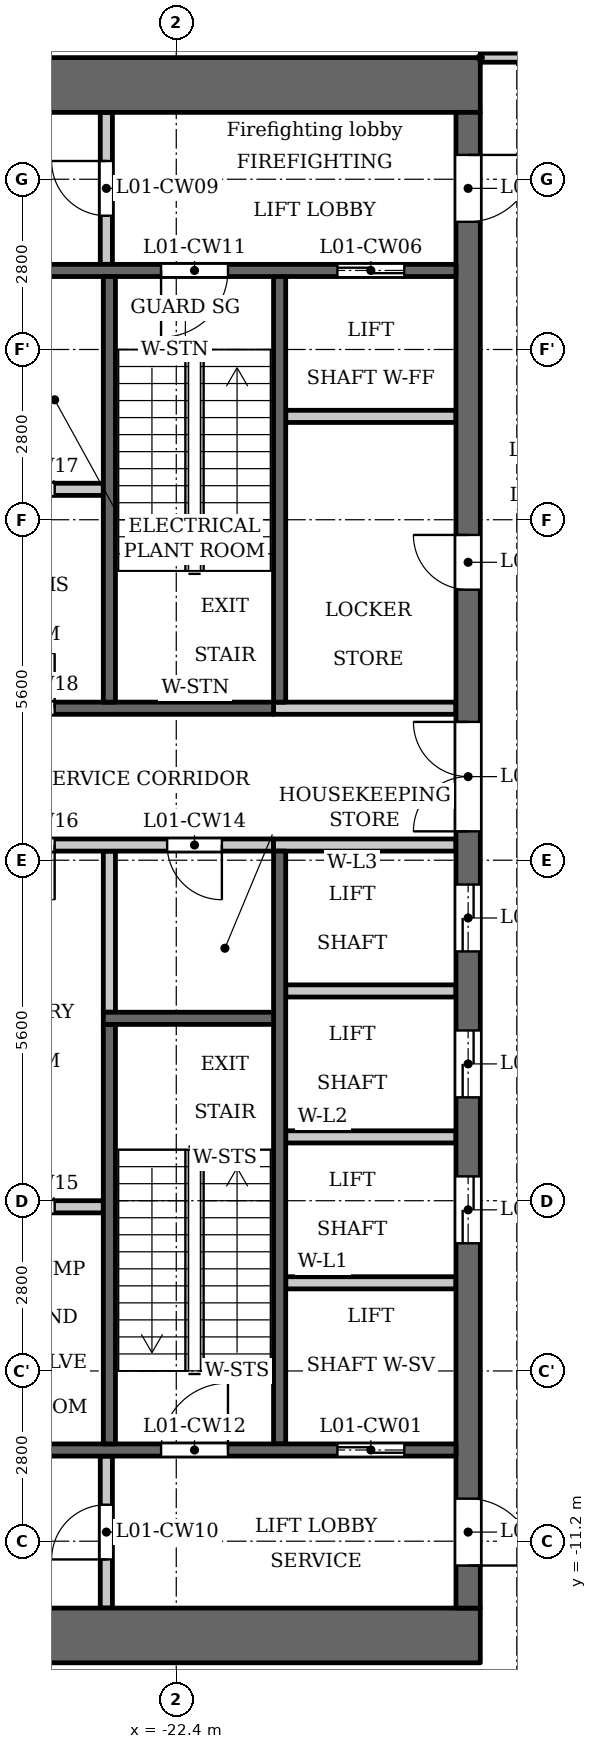
"""IFC4 building model, lengths in metres.
Left out: names, types, materials, properties, quantities, classifications, styles, units other than length and angle.
Written with IfcOpenShell. Run it as: python <this file> out.ifc"""

import sys

from ifc_helpers import new_model, si_unit, direction, frame, frame_2d, origin, place, context, subcontext, project, spatial, rectangle, extrude, element, fill, save


model = new_model("IFC4")
c1 = context("Model", 3, precision=1e-05, world=origin(), true_north=direction((0.0, 1.0)))
c2 = subcontext(c1, "Body", "Model", "MODEL_VIEW")
j1 = project(units=[si_unit("LENGTHUNIT", "METRE"), si_unit("PLANEANGLEUNIT", "RADIAN")], contexts=[c1])
p1 = place(None, origin())
s1 = spatial("IfcSite", under=j1, at=p1, CompositionType="ELEMENT")
p2 = place(p1, origin())
s2 = spatial("IfcBuilding", under=s1, at=p2, CompositionType="ELEMENT")
p3 = place(p2, frame((0.0, 0.0, 6.5)))
s3 = spatial("IfcBuildingStorey", under=s2, at=p3, CompositionType="ELEMENT", Elevation=6.5)
p4 = place(p3, frame((-23.5, -2.5, 0.0), z_axis=(0.0, 0.0, 1.0), x_axis=(0.0, 1.0, 0.0)))
e1 = element("IfcWall", 1, at=p4, inside=s3, PredefinedType="PARTITIONING", context=c2, shape_type="SweptSolid", body=[
    extrude(rectangle(XDim=2.65, YDim=0.2, at=frame_2d((1.325, 0.0))), origin(), (0.0, 0.0, 1.0), 4.45),
])
p5 = place(p3, frame((-20.7, 2.6, 0.0), z_axis=(0.0, 0.0, 1.0), x_axis=(0.0, 1.0, 0.0)))
e2 = element("IfcWall", 2, at=p5, inside=s3, PredefinedType="SHEAR", context=c2, shape_type="SweptSolid", body=[
    extrude(rectangle(XDim=7.0, YDim=0.2, at=frame_2d((3.5, 0.0))), origin(), (0.0, 0.0, 1.0), 4.45),
])
p6 = place(p3, frame((-20.7, -9.6, 0.0), z_axis=(0.0, 0.0, 1.0), x_axis=(0.0, 1.0, 0.0)))
e3 = element("IfcWall", 3, at=p6, inside=s3, PredefinedType="SHEAR", context=c2, shape_type="SweptSolid", body=[
    extrude(rectangle(XDim=9.75, YDim=0.2, at=frame_2d((4.875, 0.0))), origin(), (0.0, 0.0, 1.0), 4.45),
])
p7 = place(p3, frame((-20.8, 2.5, 0.0), z_axis=(0.0, 0.0, 1.0), x_axis=(-1.0, 0.0, 0.0)))
e4 = element("IfcWall", 4, at=p7, inside=s3, PredefinedType="SHEAR", context=c2, shape_type="SweptSolid", body=[
    extrude(rectangle(XDim=5.3, YDim=0.2, at=frame_2d((2.65, 0.0))), origin(), (0.0, 0.0, 1.0), 4.45),
])
p8 = place(p7, frame((3.6, 0.0, 0.0)))
e5 = element("IfcOpeningElement", 5, at=p8, cuts=e4, PredefinedType="OPENING", context=c2, shape_type="SweptSolid", body=[
    extrude(rectangle(XDim=0.9, YDim=2.1, at=frame_2d((0.45, 1.05))), frame((0.0, 0.11, 0.0), z_axis=(0.0, -1.0, 0.0), x_axis=(1.0, 0.0, 0.0)), (0.0, 0.0, 1.0), 0.22),
])
p9 = place(p3, frame((-20.8, 0.25, 0.0), z_axis=(0.0, 0.0, 1.0), x_axis=(-1.0, 0.0, 0.0)))
e6 = element("IfcWall", 6, at=p9, inside=s3, PredefinedType="PARTITIONING", context=c2, shape_type="SweptSolid", body=[
    extrude(rectangle(XDim=5.3, YDim=0.2, at=frame_2d((2.65, 0.0))), origin(), (0.0, 0.0, 1.0), 4.45),
])
p10 = place(p9, frame((0.85, 0.0, 0.0)))
e7 = element("IfcOpeningElement", 7, at=p10, cuts=e6, PredefinedType="OPENING", context=c2, shape_type="SweptSolid", body=[
    extrude(rectangle(XDim=0.9, YDim=2.1, at=frame_2d((0.45, 1.05))), frame((0.0, 0.11, 0.0), z_axis=(0.0, -1.0, 0.0), x_axis=(1.0, 0.0, 0.0)), (0.0, 0.0, 1.0), 0.22),
])
p11 = place(p9, frame((3.6, 0.0, 0.0)))
e8 = element("IfcOpeningElement", 8, at=p11, cuts=e6, PredefinedType="OPENING", context=c2, shape_type="SweptSolid", body=[
    extrude(rectangle(XDim=0.9, YDim=2.1, at=frame_2d((0.45, 1.05))), frame((0.0, 0.11, 0.0), z_axis=(0.0, -1.0, 0.0), x_axis=(1.0, 0.0, 0.0)), (0.0, 0.0, 1.0), 0.22),
])
for number, where, z_axis, x_axis in (
    (9, (-17.4, 12.75, 0.0), (0.0, 0.0, 1.0), (-1.0, 0.0, 0.0)),
    (10, (-17.4, -12.75, 0.0), (0.0, 0.0, 1.0), (-1.0, 0.0, 0.0)),
):
    element("IfcWall", number, at=place(p3, frame(where, z_axis=z_axis, x_axis=x_axis)), inside=s3, PredefinedType="SHEAR", context=c2, shape_type="SweptSolid", body=[
        extrude(rectangle(XDim=10.4, YDim=0.9, at=frame_2d((5.2, 0.0))), origin(), (0.0, 0.0, 1.0), 4.45),
    ])
p12 = place(p3, frame((-17.6, -12.3, 0.0), z_axis=(0.0, 0.0, 1.0), x_axis=(0.0, 1.0, 0.0)))
e11 = element("IfcWall", 11, at=p12, inside=s3, PredefinedType="SHEAR", context=c2, shape_type="SweptSolid", body=[
    extrude(rectangle(XDim=24.6, YDim=0.4, at=frame_2d((12.3, 0.0))), origin(), (0.0, 0.0, 1.0), 4.45),
])
p13 = place(p12, frame((6.0, 0.0, 0.0)))
e12 = element("IfcOpeningElement", 12, at=p13, cuts=e11, PredefinedType="OPENING", context=c2, shape_type="SweptSolid", body=[
    extrude(rectangle(XDim=1.1, YDim=2.1, at=frame_2d((0.55, 1.05))), frame((0.0, 0.21, 0.0), z_axis=(0.0, -1.0, 0.0), x_axis=(1.0, 0.0, 0.0)), (0.0, 0.0, 1.0), 0.42),
])
p14 = place(p12, frame((8.4, 0.0, 0.0)))
e13 = element("IfcOpeningElement", 13, at=p14, cuts=e11, PredefinedType="OPENING", context=c2, shape_type="SweptSolid", body=[
    extrude(rectangle(XDim=1.1, YDim=2.1, at=frame_2d((0.55, 1.05))), frame((0.0, 0.21, 0.0), z_axis=(0.0, -1.0, 0.0), x_axis=(1.0, 0.0, 0.0)), (0.0, 0.0, 1.0), 0.42),
])
p15 = place(p12, frame((10.8, 0.0, 0.0)))
e14 = element("IfcOpeningElement", 14, at=p15, cuts=e11, PredefinedType="OPENING", context=c2, shape_type="SweptSolid", body=[
    extrude(rectangle(XDim=1.1, YDim=2.1, at=frame_2d((0.55, 1.05))), frame((0.0, 0.21, 0.0), z_axis=(0.0, -1.0, 0.0), x_axis=(1.0, 0.0, 0.0)), (0.0, 0.0, 1.0), 0.42),
])
p16 = place(p12, frame((16.75, 0.0, 0.0)))
e15 = element("IfcOpeningElement", 15, at=p16, cuts=e11, PredefinedType="OPENING", context=c2, shape_type="SweptSolid", body=[
    extrude(rectangle(XDim=0.9, YDim=2.1, at=frame_2d((0.45, 1.05))), frame((0.0, 0.21, 0.0), z_axis=(0.0, -1.0, 0.0), x_axis=(1.0, 0.0, 0.0)), (0.0, 0.0, 1.0), 0.42),
])
p17 = place(p12, frame((22.8, 0.0, 0.0)))
e16 = element("IfcOpeningElement", 16, at=p17, cuts=e11, PredefinedType="OPENING", context=c2, shape_type="SweptSolid", body=[
    extrude(rectangle(XDim=1.1, YDim=2.1, at=frame_2d((0.55, 1.05))), frame((0.0, 0.21, 0.0), z_axis=(0.0, -1.0, 0.0), x_axis=(1.0, 0.0, 0.0)), (0.0, 0.0, 1.0), 0.42),
])
p18 = place(p12, frame((0.7, 0.0, 0.0)))
e17 = element("IfcOpeningElement", 17, at=p18, cuts=e11, PredefinedType="OPENING", context=c2, shape_type="SweptSolid", body=[
    extrude(rectangle(XDim=1.1, YDim=2.1, at=frame_2d((0.55, 1.05))), frame((0.0, 0.21, 0.0), z_axis=(0.0, -1.0, 0.0), x_axis=(1.0, 0.0, 0.0)), (0.0, 0.0, 1.0), 0.42),
])
p19 = place(p12, frame((12.775, 0.0, 0.0)))
e18 = element("IfcOpeningElement", 18, at=p19, cuts=e11, PredefinedType="OPENING", context=c2, shape_type="SweptSolid", body=[
    extrude(rectangle(XDim=1.8, YDim=2.1, at=frame_2d((0.9, 1.05))), frame((0.0, 0.21, 0.0), z_axis=(0.0, -1.0, 0.0), x_axis=(1.0, 0.0, 0.0)), (0.0, 0.0, 1.0), 0.42),
])
p20 = place(p3, frame((-23.55, 9.8, 0.0), z_axis=(0.0, 0.0, 1.0), x_axis=(0.0, 1.0, 0.0)))
e19 = element("IfcWall", 19, at=p20, inside=s3, PredefinedType="PARTITIONING", context=c2, shape_type="SweptSolid", body=[
    extrude(rectangle(XDim=2.5, YDim=0.2, at=frame_2d((1.25, 0.0))), origin(), (0.0, 0.0, 1.0), 4.45),
])
p21 = place(p20, frame((0.8, 0.0, 0.0)))
e20 = element("IfcOpeningElement", 20, at=p21, cuts=e19, PredefinedType="OPENING", context=c2, shape_type="SweptSolid", body=[
    extrude(rectangle(XDim=0.9, YDim=2.1, at=frame_2d((0.45, 1.05))), frame((0.0, 0.11, 0.0), z_axis=(0.0, -1.0, 0.0), x_axis=(1.0, 0.0, 0.0)), (0.0, 0.0, 1.0), 0.22),
])
p22 = place(p3, frame((-23.55, -12.3, 0.0), z_axis=(0.0, 0.0, 1.0), x_axis=(0.0, 1.0, 0.0)))
e21 = element("IfcWall", 21, at=p22, inside=s3, PredefinedType="PARTITIONING", context=c2, shape_type="SweptSolid", body=[
    extrude(rectangle(XDim=2.5, YDim=0.2, at=frame_2d((1.25, 0.0))), origin(), (0.0, 0.0, 1.0), 4.45),
])
p23 = place(p22, frame((0.8, 0.0, 0.0)))
e22 = element("IfcOpeningElement", 22, at=p23, cuts=e21, PredefinedType="OPENING", context=c2, shape_type="SweptSolid", body=[
    extrude(rectangle(XDim=0.9, YDim=2.1, at=frame_2d((0.45, 1.05))), frame((0.0, 0.11, 0.0), z_axis=(0.0, -1.0, 0.0), x_axis=(1.0, 0.0, 0.0)), (0.0, 0.0, 1.0), 0.22),
])
p24 = place(p3, frame((-23.6, -5.7, 0.0), z_axis=(0.0, 0.0, 1.0), x_axis=(-1.0, 0.0, 0.0)))
e23 = element("IfcWall", 23, at=p24, inside=s3, PredefinedType="PARTITIONING", context=c2, shape_type="SweptSolid", body=[
    extrude(rectangle(XDim=2.5, YDim=0.2, at=frame_2d((1.25, 0.0))), origin(), (0.0, 0.0, 1.0), 4.45),
])
p25 = place(p24, frame((0.8, 0.0, 0.0)))
e24 = element("IfcOpeningElement", 24, at=p25, cuts=e23, PredefinedType="OPENING", context=c2, shape_type="SweptSolid", body=[
    extrude(rectangle(XDim=0.9, YDim=2.1, at=frame_2d((0.45, 1.05))), frame((0.0, 0.11, 0.0), z_axis=(0.0, -1.0, 0.0), x_axis=(1.0, 0.0, 0.0)), (0.0, 0.0, 1.0), 0.22),
])
p26 = place(p3, frame((-23.6, 6.1, 0.0), z_axis=(0.0, 0.0, 1.0), x_axis=(-1.0, 0.0, 0.0)))
e25 = element("IfcWall", 25, at=p26, inside=s3, PredefinedType="PARTITIONING", context=c2, shape_type="SweptSolid", body=[
    extrude(rectangle(XDim=2.5, YDim=0.2, at=frame_2d((1.25, 0.0))), origin(), (0.0, 0.0, 1.0), 4.45),
])
p27 = place(p26, frame((0.8, 0.0, 0.0)))
e26 = element("IfcOpeningElement", 26, at=p27, cuts=e25, PredefinedType="OPENING", context=c2, shape_type="SweptSolid", body=[
    extrude(rectangle(XDim=0.9, YDim=2.1, at=frame_2d((0.45, 1.05))), frame((0.0, 0.11, 0.0), z_axis=(0.0, -1.0, 0.0), x_axis=(1.0, 0.0, 0.0)), (0.0, 0.0, 1.0), 0.22),
])
p28 = place(p3, frame((-17.8, -9.7, 0.0), z_axis=(0.0, 0.0, 1.0), x_axis=(-1.0, 0.0, 0.0)))
e27 = element("IfcWall", 27, at=p28, inside=s3, PredefinedType="SHEAR", context=c2, shape_type="SweptSolid", body=[
    extrude(rectangle(XDim=8.3, YDim=0.2, at=frame_2d((4.15, 0.0))), origin(), (0.0, 0.0, 1.0), 4.45),
])
p29 = place(p28, frame((0.85, 0.0, 0.0)))
e28 = element("IfcOpeningElement", 28, at=p29, cuts=e27, PredefinedType="OPENING", context=c2, shape_type="SweptSolid", body=[
    extrude(rectangle(XDim=1.1, YDim=2.1, at=frame_2d((0.55, 1.05))), frame((0.0, 0.11, 0.0), z_axis=(0.0, -1.0, 0.0), x_axis=(1.0, 0.0, 0.0)), (0.0, 0.0, 1.0), 0.22),
])
p30 = place(p28, frame((3.75, 0.0, 0.0)))
e29 = element("IfcOpeningElement", 29, at=p30, cuts=e27, PredefinedType="OPENING", context=c2, shape_type="SweptSolid", body=[
    extrude(rectangle(XDim=1.1, YDim=2.1, at=frame_2d((0.55, 1.05))), frame((0.0, 0.11, 0.0), z_axis=(0.0, -1.0, 0.0), x_axis=(1.0, 0.0, 0.0)), (0.0, 0.0, 1.0), 0.22),
])
for number, where, z_axis, x_axis in (
    (30, (-17.8, -6.95, 0.0), (0.0, 0.0, 1.0), (-1.0, 0.0, 0.0)),
    (31, (-17.8, -4.55, 0.0), (0.0, 0.0, 1.0), (-1.0, 0.0, 0.0)),
    (32, (-17.8, -2.15, 0.0), (0.0, 0.0, 1.0), (-1.0, 0.0, 0.0)),
):
    element("IfcWall", number, at=place(p3, frame(where, z_axis=z_axis, x_axis=x_axis)), inside=s3, PredefinedType="PARTITIONING", context=c2, shape_type="SweptSolid", body=[
        extrude(rectangle(XDim=2.8, YDim=0.2, at=frame_2d((1.4, 0.0))), origin(), (0.0, 0.0, 1.0), 4.45),
    ])
for number, where, z_axis, x_axis in (
    (33, (-17.8, 0.25, 0.0), (0.0, 0.0, 1.0), (-1.0, 0.0, 0.0)),
    (34, (-17.8, 2.5, 0.0), (0.0, 0.0, 1.0), (-1.0, 0.0, 0.0)),
):
    element("IfcWall", number, at=place(p3, frame(where, z_axis=z_axis, x_axis=x_axis)), inside=s3, PredefinedType="PARTITIONING", context=c2, shape_type="SweptSolid", body=[
        extrude(rectangle(XDim=3.0, YDim=0.2, at=frame_2d((1.5, 0.0))), origin(), (0.0, 0.0, 1.0), 4.45),
    ])
p31 = place(p3, frame((-17.8, 7.3, 0.0), z_axis=(0.0, 0.0, 1.0), x_axis=(-1.0, 0.0, 0.0)))
e35 = element("IfcWall", 35, at=p31, inside=s3, PredefinedType="PARTITIONING", context=c2, shape_type="SweptSolid", body=[
    extrude(rectangle(XDim=2.8, YDim=0.2, at=frame_2d((1.4, 0.0))), origin(), (0.0, 0.0, 1.0), 4.45),
])
p32 = place(p3, frame((-17.8, 9.7, 0.0), z_axis=(0.0, 0.0, 1.0), x_axis=(-1.0, 0.0, 0.0)))
e36 = element("IfcWall", 36, at=p32, inside=s3, PredefinedType="SHEAR", context=c2, shape_type="SweptSolid", body=[
    extrude(rectangle(XDim=8.3, YDim=0.2, at=frame_2d((4.15, 0.0))), origin(), (0.0, 0.0, 1.0), 4.45),
])
p33 = place(p32, frame((0.85, 0.0, 0.0)))
e37 = element("IfcOpeningElement", 37, at=p33, cuts=e36, PredefinedType="OPENING", context=c2, shape_type="SweptSolid", body=[
    extrude(rectangle(XDim=1.1, YDim=2.1, at=frame_2d((0.55, 1.05))), frame((0.0, 0.11, 0.0), z_axis=(0.0, -1.0, 0.0), x_axis=(1.0, 0.0, 0.0)), (0.0, 0.0, 1.0), 0.22),
])
p34 = place(p32, frame((3.75, 0.0, 0.0)))
e38 = element("IfcOpeningElement", 38, at=p34, cuts=e36, PredefinedType="OPENING", context=c2, shape_type="SweptSolid", body=[
    extrude(rectangle(XDim=1.1, YDim=2.1, at=frame_2d((0.55, 1.05))), frame((0.0, 0.11, 0.0), z_axis=(0.0, -1.0, 0.0), x_axis=(1.0, 0.0, 0.0)), (0.0, 0.0, 1.0), 0.22),
])
p35 = place(p3, frame((-23.5, 2.6, 0.0), z_axis=(0.0, 0.0, 1.0), x_axis=(0.0, 1.0, 0.0)))
e39 = element("IfcWall", 39, at=p35, inside=s3, PredefinedType="SHEAR", context=c2, shape_type="SweptSolid", body=[
    extrude(rectangle(XDim=7.0, YDim=0.2, at=frame_2d((3.5, 0.0))), origin(), (0.0, 0.0, 1.0), 4.45),
])
p36 = place(p3, frame((-23.5, -9.6, 0.0), z_axis=(0.0, 0.0, 1.0), x_axis=(0.0, 1.0, 0.0)))
e40 = element("IfcWall", 40, at=p36, inside=s3, PredefinedType="SHEAR", context=c2, shape_type="SweptSolid", body=[
    extrude(rectangle(XDim=6.9, YDim=0.2, at=frame_2d((3.45, 0.0))), origin(), (0.0, 0.0, 1.0), 4.45),
])
p37 = place(p3, frame((-20.8, -2.6, 0.0), z_axis=(0.0, 0.0, 1.0), x_axis=(-1.0, 0.0, 0.0)))
e41 = element("IfcWall", 41, at=p37, inside=s3, PredefinedType="SHEAR", context=c2, shape_type="SweptSolid", body=[
    extrude(rectangle(XDim=2.8, YDim=0.2, at=frame_2d((1.4, 0.0))), origin(), (0.0, 0.0, 1.0), 4.45),
])
p38 = place(p3, frame((-17.4, 13.2, 0.0), z_axis=(0.0, 0.0, 1.0), x_axis=(1.0, 0.0, 0.0)))
e42 = element("IfcWall", 42, at=p38, inside=s3, PredefinedType="PARTITIONING", context=c2, shape_type="SweptSolid", body=[
    extrude(rectangle(XDim=34.8, YDim=0.15, at=frame_2d((17.4, 0.0))), origin(), (0.0, 0.0, 1.0), 4.45),
])
p39 = place(p38, frame((3.05, 0.0, 0.0)))
e43 = element("IfcOpeningElement", 43, at=p39, cuts=e42, PredefinedType="OPENING", context=c2, shape_type="SweptSolid", body=[
    extrude(rectangle(XDim=1.8, YDim=2.1, at=frame_2d((0.9, 1.05))), frame((0.0, 0.085, 0.0), z_axis=(0.0, -1.0, 0.0), x_axis=(1.0, 0.0, 0.0)), (0.0, 0.0, 1.0), 0.17),
])
p40 = place(p38, frame((0.75, 0.0, 0.0)))
e44 = element("IfcOpeningElement", 44, at=p40, cuts=e42, PredefinedType="OPENING", context=c2, shape_type="SweptSolid", body=[
    extrude(rectangle(XDim=1.0, YDim=2.1, at=frame_2d((0.5, 1.05))), frame((0.0, 0.085, 0.0), z_axis=(0.0, -1.0, 0.0), x_axis=(1.0, 0.0, 0.0)), (0.0, 0.0, 1.0), 0.17),
])
p41 = place(p38, frame((33.15, 0.0, 0.0)))
e45 = element("IfcOpeningElement", 45, at=p41, cuts=e42, PredefinedType="OPENING", context=c2, shape_type="SweptSolid", body=[
    extrude(rectangle(XDim=1.0, YDim=2.1, at=frame_2d((0.5, 1.05))), frame((0.0, 0.085, 0.0), z_axis=(0.0, -1.0, 0.0), x_axis=(1.0, 0.0, 0.0)), (0.0, 0.0, 1.0), 0.17),
])
p42 = place(p29, origin())
e46 = element("IfcDoor", 46, at=p42, inside=s3, OperationType="DOUBLE_DOOR_SLIDING", PredefinedType="DOOR", context=c2, shape_type="SweptSolid", body=[
    extrude(rectangle(XDim=1.1, YDim=2.1, at=frame_2d((0.55, 1.05))), frame((0.0, 0.025, 0.0), z_axis=(0.0, -1.0, 0.0), x_axis=(1.0, 0.0, 0.0)), (0.0, 0.0, 1.0), 0.05),
])
fill(e28, e46)
p43 = place(p13, origin())
e47 = element("IfcDoor", 47, at=p43, inside=s3, OperationType="DOUBLE_DOOR_SLIDING", PredefinedType="DOOR", context=c2, shape_type="SweptSolid", body=[
    extrude(rectangle(XDim=1.1, YDim=2.1, at=frame_2d((0.55, 1.05))), frame((0.0, 0.025, 0.0), z_axis=(0.0, -1.0, 0.0), x_axis=(1.0, 0.0, 0.0)), (0.0, 0.0, 1.0), 0.05),
])
fill(e12, e47)
p44 = place(p14, origin())
e48 = element("IfcDoor", 48, at=p44, inside=s3, OperationType="DOUBLE_DOOR_SLIDING", PredefinedType="DOOR", context=c2, shape_type="SweptSolid", body=[
    extrude(rectangle(XDim=1.1, YDim=2.1, at=frame_2d((0.55, 1.05))), frame((0.0, 0.025, 0.0), z_axis=(0.0, -1.0, 0.0), x_axis=(1.0, 0.0, 0.0)), (0.0, 0.0, 1.0), 0.05),
])
fill(e13, e48)
p45 = place(p15, origin())
e49 = element("IfcDoor", 49, at=p45, inside=s3, OperationType="DOUBLE_DOOR_SLIDING", PredefinedType="DOOR", context=c2, shape_type="SweptSolid", body=[
    extrude(rectangle(XDim=1.1, YDim=2.1, at=frame_2d((0.55, 1.05))), frame((0.0, 0.025, 0.0), z_axis=(0.0, -1.0, 0.0), x_axis=(1.0, 0.0, 0.0)), (0.0, 0.0, 1.0), 0.05),
])
fill(e14, e49)
p46 = place(p16, origin())
e50 = element("IfcDoor", 50, at=p46, inside=s3, OperationType="SINGLE_SWING_LEFT", PredefinedType="DOOR", context=c2, shape_type="SweptSolid", body=[
    extrude(rectangle(XDim=0.9, YDim=2.1, at=frame_2d((0.45, 1.05))), frame((0.0, 0.025, 0.0), z_axis=(0.0, -1.0, 0.0), x_axis=(1.0, 0.0, 0.0)), (0.0, 0.0, 1.0), 0.05),
])
fill(e15, e50)
p47 = place(p33, origin())
e51 = element("IfcDoor", 51, at=p47, inside=s3, OperationType="DOUBLE_DOOR_SLIDING", PredefinedType="DOOR", context=c2, shape_type="SweptSolid", body=[
    extrude(rectangle(XDim=1.1, YDim=2.1, at=frame_2d((0.55, 1.05))), frame((0.0, 0.025, 0.0), z_axis=(0.0, -1.0, 0.0), x_axis=(1.0, 0.0, 0.0)), (0.0, 0.0, 1.0), 0.05),
])
fill(e37, e51)
p48 = place(p17, origin())
e52 = element("IfcDoor", 52, at=p48, inside=s3, OperationType="SINGLE_SWING_RIGHT", PredefinedType="DOOR", context=c2, shape_type="SweptSolid", body=[
    extrude(rectangle(XDim=1.1, YDim=2.1, at=frame_2d((0.55, 1.05))), frame((0.0, 0.025, 0.0), z_axis=(0.0, -1.0, 0.0), x_axis=(1.0, 0.0, 0.0)), (0.0, 0.0, 1.0), 0.05),
])
fill(e16, e52)
p49 = place(p18, origin())
e53 = element("IfcDoor", 53, at=p49, inside=s3, OperationType="SINGLE_SWING_LEFT", PredefinedType="DOOR", context=c2, shape_type="SweptSolid", body=[
    extrude(rectangle(XDim=1.1, YDim=2.1, at=frame_2d((0.55, 1.05))), frame((0.0, 0.025, 0.0), z_axis=(0.0, -1.0, 0.0), x_axis=(1.0, 0.0, 0.0)), (0.0, 0.0, 1.0), 0.05),
])
fill(e17, e53)
p50 = place(p21, origin())
e54 = element("IfcDoor", 54, at=p50, inside=s3, OperationType="SINGLE_SWING_LEFT", PredefinedType="DOOR", context=c2, shape_type="SweptSolid", body=[
    extrude(rectangle(XDim=0.9, YDim=2.1, at=frame_2d((0.45, 1.05))), frame((0.0, 0.025, 0.0), z_axis=(0.0, -1.0, 0.0), x_axis=(1.0, 0.0, 0.0)), (0.0, 0.0, 1.0), 0.05),
])
fill(e20, e54)
p51 = place(p23, origin())
e55 = element("IfcDoor", 55, at=p51, inside=s3, OperationType="SINGLE_SWING_RIGHT", PredefinedType="DOOR", context=c2, shape_type="SweptSolid", body=[
    extrude(rectangle(XDim=0.9, YDim=2.1, at=frame_2d((0.45, 1.05))), frame((0.0, 0.025, 0.0), z_axis=(0.0, -1.0, 0.0), x_axis=(1.0, 0.0, 0.0)), (0.0, 0.0, 1.0), 0.05),
])
fill(e22, e55)
p52 = place(p34, origin())
e56 = element("IfcDoor", 56, at=p52, inside=s3, OperationType="SINGLE_SWING_LEFT", PredefinedType="DOOR", context=c2, shape_type="SweptSolid", body=[
    extrude(rectangle(XDim=1.1, YDim=2.1, at=frame_2d((0.55, 1.05))), frame((0.0, 0.025, 0.0), z_axis=(0.0, -1.0, 0.0), x_axis=(1.0, 0.0, 0.0)), (0.0, 0.0, 1.0), 0.05),
])
fill(e38, e56)
p53 = place(p30, origin())
e57 = element("IfcDoor", 57, at=p53, inside=s3, OperationType="SINGLE_SWING_LEFT", PredefinedType="DOOR", context=c2, shape_type="SweptSolid", body=[
    extrude(rectangle(XDim=1.1, YDim=2.1, at=frame_2d((0.55, 1.05))), frame((0.0, 0.025, 0.0), z_axis=(0.0, -1.0, 0.0), x_axis=(1.0, 0.0, 0.0)), (0.0, 0.0, 1.0), 0.05),
])
fill(e29, e57)
p54 = place(p19, origin())
e58 = element("IfcDoor", 58, at=p54, inside=s3, OperationType="DOUBLE_DOOR_SINGLE_SWING", PredefinedType="DOOR", context=c2, shape_type="SweptSolid", body=[
    extrude(rectangle(XDim=1.8, YDim=2.1, at=frame_2d((0.9, 1.05))), frame((0.0, 0.025, 0.0), z_axis=(0.0, -1.0, 0.0), x_axis=(1.0, 0.0, 0.0)), (0.0, 0.0, 1.0), 0.05),
])
fill(e18, e58)
p55 = place(p10, origin())
e59 = element("IfcDoor", 59, at=p55, inside=s3, OperationType="SINGLE_SWING_RIGHT", PredefinedType="DOOR", context=c2, shape_type="SweptSolid", body=[
    extrude(rectangle(XDim=0.9, YDim=2.1, at=frame_2d((0.45, 1.05))), frame((0.0, 0.025, 0.0), z_axis=(0.0, -1.0, 0.0), x_axis=(1.0, 0.0, 0.0)), (0.0, 0.0, 1.0), 0.05),
])
fill(e7, e59)
p56 = place(p25, origin())
e60 = element("IfcDoor", 60, at=p56, inside=s3, OperationType="SINGLE_SWING_RIGHT", PredefinedType="DOOR", context=c2, shape_type="SweptSolid", body=[
    extrude(rectangle(XDim=0.9, YDim=2.1, at=frame_2d((0.45, 1.05))), frame((0.0, 0.025, 0.0), z_axis=(0.0, -1.0, 0.0), x_axis=(1.0, 0.0, 0.0)), (0.0, 0.0, 1.0), 0.05),
])
fill(e24, e60)
p57 = place(p11, origin())
e61 = element("IfcDoor", 61, at=p57, inside=s3, OperationType="SINGLE_SWING_RIGHT", PredefinedType="DOOR", context=c2, shape_type="SweptSolid", body=[
    extrude(rectangle(XDim=0.9, YDim=2.1, at=frame_2d((0.45, 1.05))), frame((0.0, 0.025, 0.0), z_axis=(0.0, -1.0, 0.0), x_axis=(1.0, 0.0, 0.0)), (0.0, 0.0, 1.0), 0.05),
])
fill(e8, e61)
p58 = place(p27, origin())
e62 = element("IfcDoor", 62, at=p58, inside=s3, OperationType="SINGLE_SWING_RIGHT", PredefinedType="DOOR", context=c2, shape_type="SweptSolid", body=[
    extrude(rectangle(XDim=0.9, YDim=2.1, at=frame_2d((0.45, 1.05))), frame((0.0, 0.025, 0.0), z_axis=(0.0, -1.0, 0.0), x_axis=(1.0, 0.0, 0.0)), (0.0, 0.0, 1.0), 0.05),
])
fill(e26, e62)
p59 = place(p8, origin())
e63 = element("IfcDoor", 63, at=p59, inside=s3, OperationType="SINGLE_SWING_LEFT", PredefinedType="DOOR", context=c2, shape_type="SweptSolid", body=[
    extrude(rectangle(XDim=0.9, YDim=2.1, at=frame_2d((0.45, 1.05))), frame((0.0, 0.025, 0.0), z_axis=(0.0, -1.0, 0.0), x_axis=(1.0, 0.0, 0.0)), (0.0, 0.0, 1.0), 0.05),
])
fill(e5, e63)
save(model, sys.argv[1])
